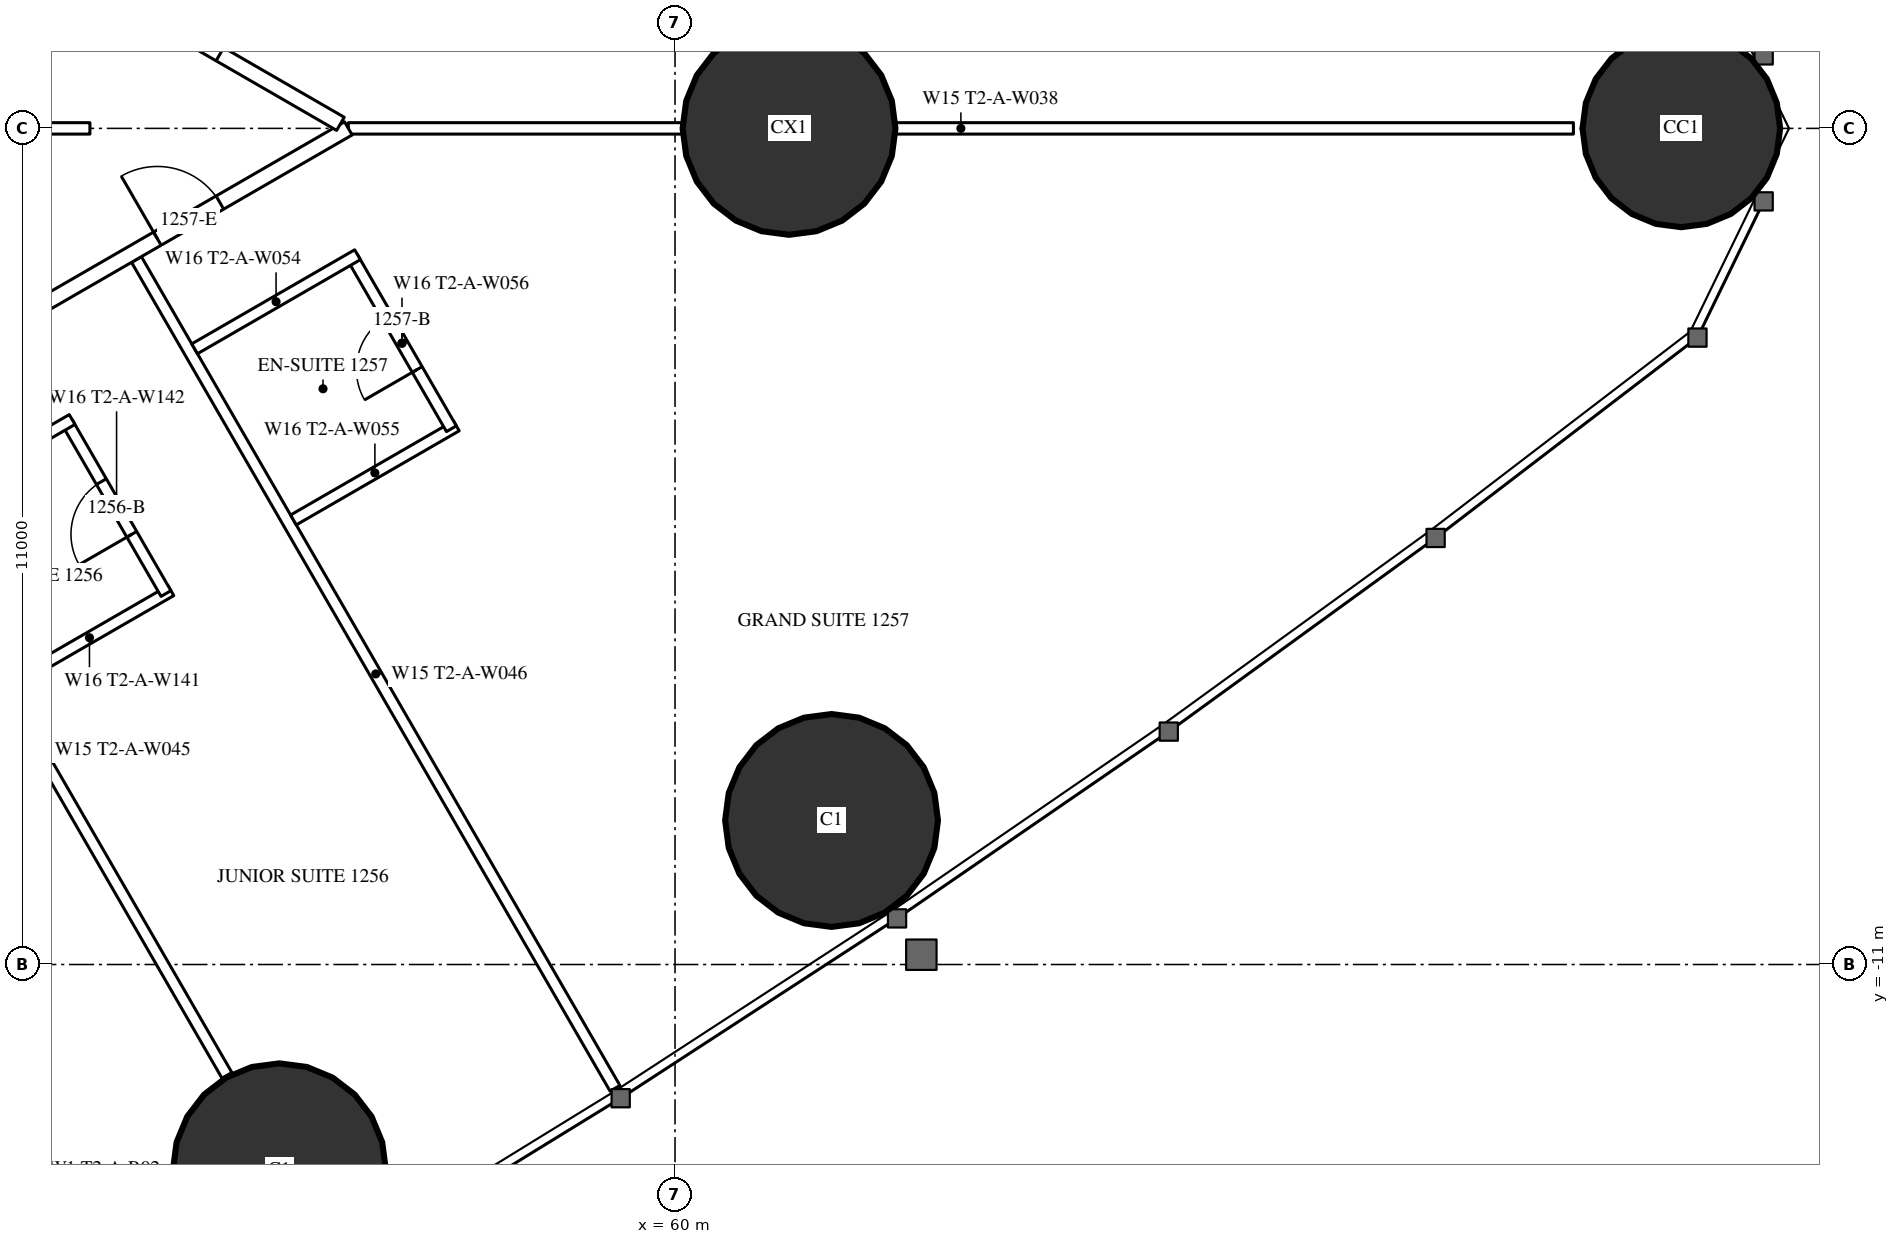
"""IFC4 building model, lengths in metres.
Left out: names, types, materials, properties, quantities, classifications, styles, units other than length and angle.
Written with IfcOpenShell. Run it as: python <this file> out.ifc"""

import sys

from ifc_helpers import new_model, si_unit, direction, frame, frame_2d, origin, origin_2d, place, context, subcontext, project, spatial, rectangle, hollow_circle, extrude, element, fill, save


model = new_model("IFC4")
c1 = context("Model", 3, precision=1e-05, world=origin(), true_north=direction((0.0, 1.0)))
c2 = subcontext(c1, "Body", "Model", "MODEL_VIEW")
j1 = project(units=[si_unit("LENGTHUNIT", "METRE"), si_unit("PLANEANGLEUNIT", "RADIAN")], contexts=[c1])
p1 = place(None, origin())
s1 = spatial("IfcSite", under=j1, at=p1, CompositionType="ELEMENT")
p2 = place(p1, origin())
s2 = spatial("IfcBuilding", under=s1, at=p2, CompositionType="ELEMENT")
p3 = place(p2, frame((0.0, 0.0, 49.5)))
s3 = spatial("IfcBuildingStorey", under=s2, at=p3, CompositionType="ELEMENT", Elevation=49.5)
p4 = place(p3, frame((73.239, 0.0, 0.0), z_axis=(0.0, 0.0, 1.0), x_axis=(1.0, 0.0, 0.0)))
e1 = element("IfcColumn", 1, at=p4, inside=s3, PredefinedType="COLUMN", context=c2, shape_type="SweptSolid", body=[
    extrude(hollow_circle(Radius=1.3, WallThickness=0.1, at=origin_2d()), origin(), (0.0, 0.0, 1.0), 3.5),
])
for number, where, z_axis, x_axis in (
    (2, (54.795, -13.701, 0.0), (0.0, 0.0, 1.0), (1.0, 0.0, 0.0)),
    (3, (62.059, -9.105, 0.0), (0.0, 0.0, 1.0), (1.0, 0.0, 0.0)),
):
    element("IfcColumn", number, at=place(p3, frame(where, z_axis=z_axis, x_axis=x_axis)), inside=s3, PredefinedType="COLUMN", context=c2, shape_type="SweptSolid", body=[
        extrude(hollow_circle(Radius=1.4, WallThickness=0.12, at=origin_2d()), origin(), (0.0, 0.0, 1.0), 3.5),
    ])
p5 = place(p3, frame((61.5, 0.0, 0.0), z_axis=(0.0, 0.0, 1.0), x_axis=(1.0, 0.0, 0.0)))
e4 = element("IfcColumn", 4, at=p5, inside=s3, PredefinedType="COLUMN", context=c2, shape_type="SweptSolid", body=[
    extrude(hollow_circle(Radius=1.4, WallThickness=0.1, at=origin_2d()), origin(), (0.0, 0.0, 1.0), 3.5),
])
p6 = place(p3, frame((45.403, -6.062, 0.0), z_axis=(0.0, 0.0, 1.0), x_axis=(0.500007077968, -0.866021317279, 0.0)))
e5 = element("IfcWall", 5, at=p6, inside=s3, PredefinedType="PARTITIONING", context=c2, shape_type="SweptSolid", body=[
    extrude(rectangle(XDim=12.721, YDim=0.15, at=frame_2d((6.361, 0.0))), origin(), (0.0, 0.0, 1.0), 3.25),
])
p7 = place(p3, frame((49.159, -3.893, 0.0), z_axis=(0.0, 0.0, 1.0), x_axis=(0.499998773722, -0.866026111775, 0.0)))
e6 = element("IfcWall", 6, at=p7, inside=s3, PredefinedType="PARTITIONING", context=c2, shape_type="SweptSolid", body=[
    extrude(rectangle(XDim=9.892, YDim=0.15, at=frame_2d((4.946, 0.0))), origin(), (0.0, 0.0, 1.0), 2.25),
])
p8 = place(p3, frame((52.915, -1.725, 0.0), z_axis=(0.0, 0.0, 1.0), x_axis=(0.499997163113, -0.866027041656, 0.0)))
e7 = element("IfcWall", 7, at=p8, inside=s3, PredefinedType="PARTITIONING", context=c2, shape_type="SweptSolid", body=[
    extrude(rectangle(XDim=12.591, YDim=0.15, at=frame_2d((6.295, 0.0))), origin(), (0.0, 0.0, 1.0), 3.25),
])
p9 = place(p3, frame((55.702, 0.0, 0.0), z_axis=(0.0, 0.0, 1.0), x_axis=(1.0, 0.0, 0.0)))
e8 = element("IfcWall", 8, at=p9, inside=s3, PredefinedType="PARTITIONING", context=c2, shape_type="SweptSolid", body=[
    extrude(rectangle(XDim=16.117, YDim=0.15, at=frame_2d((8.059, 0.0))), origin(), (0.0, 0.0, 1.0), 2.25),
])
p10 = place(p3, frame((37.96, -10.243, 0.0), z_axis=(0.0, 0.0, 1.0), x_axis=(0.866026429433, 0.499998223521, 0.0)))
e9 = element("IfcWall", 9, at=p10, inside=s3, PredefinedType="PARTITIONING", context=c2, shape_type="SweptSolid", body=[
    extrude(rectangle(XDim=20.487, YDim=0.2, at=frame_2d((10.243, 0.0))), origin(), (0.0, 0.0, 1.0), 3.25),
])
p11 = place(p10, frame((6.925, 0.0, 0.0)))
e10 = element("IfcOpeningElement", 10, at=p11, cuts=e9, PredefinedType="OPENING", context=c2, shape_type="SweptSolid", body=[
    extrude(rectangle(XDim=0.95, YDim=2.2, at=frame_2d((0.475, 1.1))), frame((0.0, 0.11, 0.0), z_axis=(0.0, -1.0, 0.0), x_axis=(1.0, 0.0, 0.0)), (0.0, 0.0, 1.0), 0.22),
])
p12 = place(p10, frame((11.549, 0.0, 0.0)))
e11 = element("IfcOpeningElement", 11, at=p12, cuts=e9, PredefinedType="OPENING", context=c2, shape_type="SweptSolid", body=[
    extrude(rectangle(XDim=0.95, YDim=2.2, at=frame_2d((0.475, 1.1))), frame((0.0, 0.11, 0.0), z_axis=(0.0, -1.0, 0.0), x_axis=(1.0, 0.0, 0.0)), (0.0, 0.0, 1.0), 0.22),
])
p13 = place(p10, frame((13.249, 0.0, 0.0)))
e12 = element("IfcOpeningElement", 12, at=p13, cuts=e9, PredefinedType="OPENING", context=c2, shape_type="SweptSolid", body=[
    extrude(rectangle(XDim=0.95, YDim=2.2, at=frame_2d((0.475, 1.1))), frame((0.0, 0.11, 0.0), z_axis=(0.0, -1.0, 0.0), x_axis=(1.0, 0.0, 0.0)), (0.0, 0.0, 1.0), 0.22),
])
p14 = place(p10, frame((17.585, 0.0, 0.0)))
e13 = element("IfcOpeningElement", 13, at=p14, cuts=e9, PredefinedType="OPENING", context=c2, shape_type="SweptSolid", body=[
    extrude(rectangle(XDim=0.95, YDim=2.2, at=frame_2d((0.475, 1.1))), frame((0.0, 0.11, 0.0), z_axis=(0.0, -1.0, 0.0), x_axis=(1.0, 0.0, 0.0)), (0.0, 0.0, 1.0), 0.22),
])
p15 = place(p10, frame((0.6, 0.0, 0.0)))
e14 = element("IfcOpeningElement", 14, at=p15, cuts=e9, PredefinedType="OPENING", context=c2, shape_type="SweptSolid", body=[
    extrude(rectangle(XDim=0.95, YDim=2.2, at=frame_2d((0.475, 1.1))), frame((0.0, 0.11, 0.0), z_axis=(0.0, -1.0, 0.0), x_axis=(1.0, 0.0, 0.0)), (0.0, 0.0, 1.0), 0.22),
])
p16 = place(p3, frame((45.375, 5.963, 0.0), z_axis=(0.0, 0.0, 1.0), x_axis=(0.86603164725, -0.499989185844, 0.0)))
e15 = element("IfcWall", 15, at=p16, inside=s3, PredefinedType="PARTITIONING", context=c2, shape_type="SweptSolid", body=[
    extrude(rectangle(XDim=11.805, YDim=0.2, at=frame_2d((5.903, 0.0))), origin(), (0.0, 0.0, 1.0), 3.25),
])
p17 = place(p16, frame((9.024, 0.0, 0.0)))
e16 = element("IfcOpeningElement", 16, at=p17, cuts=e15, PredefinedType="OPENING", context=c2, shape_type="SweptSolid", body=[
    extrude(rectangle(XDim=0.95, YDim=2.2, at=frame_2d((0.475, 1.1))), frame((0.0, 0.11, 0.0), z_axis=(0.0, -1.0, 0.0), x_axis=(1.0, 0.0, 0.0)), (0.0, 0.0, 1.0), 0.22),
])
p18 = place(p16, frame((7.324, 0.0, 0.0)))
e17 = element("IfcOpeningElement", 17, at=p18, cuts=e15, PredefinedType="OPENING", context=c2, shape_type="SweptSolid", body=[
    extrude(rectangle(XDim=0.95, YDim=2.2, at=frame_2d((0.475, 1.1))), frame((0.0, 0.11, 0.0), z_axis=(0.0, -1.0, 0.0), x_axis=(1.0, 0.0, 0.0)), (0.0, 0.0, 1.0), 0.22),
])
p19 = place(p3, frame((51.224, -7.32, 0.0), z_axis=(0.0, 0.0, 1.0), x_axis=(0.866031185235, 0.4999899861, 0.0)))
e18 = element("IfcWall", 18, at=p19, inside=s3, PredefinedType="PARTITIONING", context=c2, shape_type="SweptSolid", body=[
    extrude(rectangle(XDim=2.475, YDim=0.15, at=frame_2d((1.238, 0.0))), origin(), (0.0, 0.0, 1.0), 3.25),
])
p20 = place(p3, frame((52.003, -3.868, 0.0), z_axis=(0.0, 0.0, 1.0), x_axis=(0.500047596559, -0.865997922154, 0.0)))
e19 = element("IfcWall", 19, at=p20, inside=s3, PredefinedType="PARTITIONING", context=c2, shape_type="SweptSolid", body=[
    extrude(rectangle(XDim=2.6, YDim=0.15, at=frame_2d((1.3, 0.0))), origin(), (0.0, 0.0, 1.0), 3.25),
])
p21 = place(p20, frame((0.9, 0.0, 0.0)))
e20 = element("IfcOpeningElement", 20, at=p21, cuts=e19, PredefinedType="OPENING", context=c2, shape_type="SweptSolid", body=[
    extrude(rectangle(XDim=0.8, YDim=2.2, at=frame_2d((0.4, 1.1))), frame((0.0, 0.085, 0.0), z_axis=(0.0, -1.0, 0.0), x_axis=(1.0, 0.0, 0.0)), (0.0, 0.0, 1.0), 0.17),
])
for number, where, z_axis, x_axis in (
    (21, (49.925, -5.068, 0.0), (0.0, 0.0, 1.0), (0.866, 0.5, 0.0)),
    (22, (54.98, -5.151, 0.0), (0.0, 0.0, 1.0), (0.866, 0.5, 0.0)),
):
    element("IfcWall", number, at=place(p3, frame(where, z_axis=z_axis, x_axis=x_axis)), inside=s3, PredefinedType="PARTITIONING", context=c2, shape_type="SweptSolid", body=[
        extrude(rectangle(XDim=2.475, YDim=0.15, at=frame_2d((1.237, 0.0))), origin(), (0.0, 0.0, 1.0), 3.25),
    ])
p22 = place(p3, frame((55.758, -1.7, 0.0), z_axis=(0.0, 0.0, 1.0), x_axis=(0.500006934395, -0.866021400173, 0.0)))
e23 = element("IfcWall", 23, at=p22, inside=s3, PredefinedType="PARTITIONING", context=c2, shape_type="SweptSolid", body=[
    extrude(rectangle(XDim=2.6, YDim=0.15, at=frame_2d((1.3, 0.0))), origin(), (0.0, 0.0, 1.0), 3.25),
])
p23 = place(p22, frame((0.9, 0.0, 0.0)))
e24 = element("IfcOpeningElement", 24, at=p23, cuts=e23, PredefinedType="OPENING", context=c2, shape_type="SweptSolid", body=[
    extrude(rectangle(XDim=0.8, YDim=2.2, at=frame_2d((0.4, 1.1))), frame((0.0, 0.085, 0.0), z_axis=(0.0, -1.0, 0.0), x_axis=(1.0, 0.0, 0.0)), (0.0, 0.0, 1.0), 0.17),
])
p24 = place(p3, frame((53.68, -2.9, 0.0), z_axis=(0.0, 0.0, 1.0), x_axis=(0.866006523861, 0.500032699561, 0.0)))
e25 = element("IfcWall", 25, at=p24, inside=s3, PredefinedType="PARTITIONING", context=c2, shape_type="SweptSolid", body=[
    extrude(rectangle(XDim=2.475, YDim=0.15, at=frame_2d((1.237, 0.0))), origin(), (0.0, 0.0, 1.0), 3.25),
])
p25 = place(p3, frame((44.575, 0.0, 0.0), z_axis=(0.0, 0.0, 1.0), x_axis=(1.0, 0.0, 0.0)))
e26 = element("IfcWall", 26, at=p25, inside=s3, PredefinedType="PARTITIONING", context=c2, shape_type="SweptSolid", body=[
    extrude(rectangle(XDim=7.727, YDim=0.15, at=frame_2d((3.864, 0.0))), origin(), (0.0, 0.0, 1.0), 2.25),
])
p26 = place(p21, origin())
e27 = element("IfcDoor", 27, at=p26, inside=s3, OperationType="SINGLE_SWING_RIGHT", PredefinedType="DOOR", context=c2, shape_type="SweptSolid", body=[
    extrude(rectangle(XDim=0.8, YDim=2.2, at=frame_2d((0.4, 1.1))), frame((0.0, 0.025, 0.0), z_axis=(0.0, -1.0, 0.0), x_axis=(1.0, 0.0, 0.0)), (0.0, 0.0, 1.0), 0.05),
])
fill(e20, e27)
p27 = place(p23, origin())
e28 = element("IfcDoor", 28, at=p27, inside=s3, OperationType="SINGLE_SWING_RIGHT", PredefinedType="DOOR", context=c2, shape_type="SweptSolid", body=[
    extrude(rectangle(XDim=0.8, YDim=2.2, at=frame_2d((0.4, 1.1))), frame((0.0, 0.025, 0.0), z_axis=(0.0, -1.0, 0.0), x_axis=(1.0, 0.0, 0.0)), (0.0, 0.0, 1.0), 0.05),
])
fill(e24, e28)
p28 = place(p14, origin())
e29 = element("IfcDoor", 29, at=p28, inside=s3, OperationType="SINGLE_SWING_LEFT", PredefinedType="DOOR", context=c2, shape_type="SweptSolid", body=[
    extrude(rectangle(XDim=0.95, YDim=2.2, at=frame_2d((0.475, 1.1))), frame((0.0, 0.025, 0.0), z_axis=(0.0, -1.0, 0.0), x_axis=(1.0, 0.0, 0.0)), (0.0, 0.0, 1.0), 0.05),
])
fill(e13, e29)
p29 = place(p17, origin())
e30 = element("IfcDoor", 30, at=p29, inside=s3, OperationType="SINGLE_SWING_LEFT", PredefinedType="DOOR", context=c2, shape_type="SweptSolid", body=[
    extrude(rectangle(XDim=0.95, YDim=2.2, at=frame_2d((0.475, 1.1))), frame((0.0, 0.025, 0.0), z_axis=(0.0, -1.0, 0.0), x_axis=(1.0, 0.0, 0.0)), (0.0, 0.0, 1.0), 0.05),
])
fill(e16, e30)
save(model, sys.argv[1])
